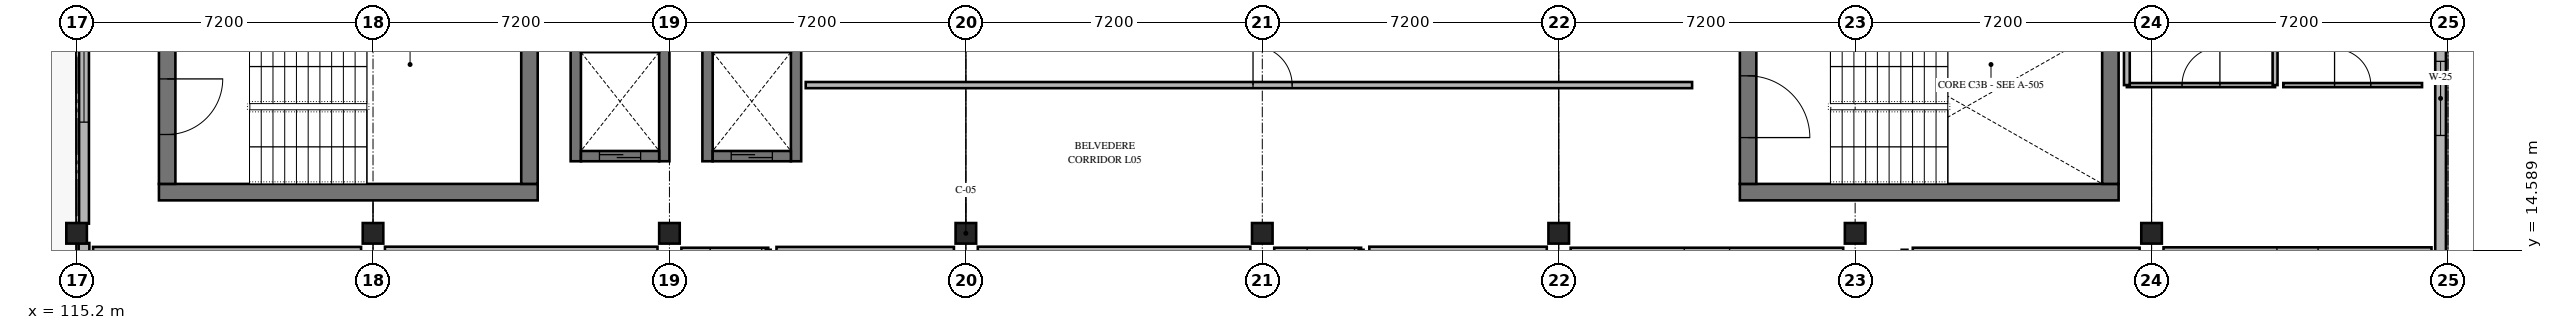
"""IFC4 building model, lengths in metres.
Left out: names, types, materials, properties, quantities, classifications, styles, units other than length and angle.
Written with IfcOpenShell. Run it as: python <this file> out.ifc"""

import sys

from ifc_helpers import new_model, si_unit, direction, frame, frame_2d, origin, origin_2d, place, context, subcontext, project, spatial, rectangle, extrude, element, fill, save


model = new_model("IFC4")
c1 = context("Model", 3, precision=1e-05, world=origin(), true_north=direction((0.0, 1.0)))
c2 = subcontext(c1, "Body", "Model", "MODEL_VIEW")
j1 = project(units=[si_unit("LENGTHUNIT", "METRE"), si_unit("PLANEANGLEUNIT", "RADIAN")], contexts=[c1])
p1 = place(None, origin())
s1 = spatial("IfcSite", under=j1, at=p1, CompositionType="ELEMENT")
p2 = place(p1, origin())
s2 = spatial("IfcBuilding", under=s1, at=p2, CompositionType="ELEMENT")
p3 = place(p2, frame((0.0, 0.0, 20.7)))
s3 = spatial("IfcBuildingStorey", under=s2, at=p3, CompositionType="ELEMENT", Elevation=20.7)
for number, where, z_axis, x_axis in (
    (1, (115.2, 15.0, 0.0), (0.0, 0.0, 1.0), (1.0, 0.0, 0.0)),
    (2, (122.4, 15.0, 0.0), (0.0, 0.0, 1.0), (1.0, 0.0, 0.0)),
    (3, (129.6, 15.0, 0.0), (0.0, 0.0, 1.0), (1.0, 0.0, 0.0)),
    (4, (136.8, 15.0, 0.0), (0.0, 0.0, 1.0), (1.0, 0.0, 0.0)),
    (5, (144.0, 15.0, 0.0), (0.0, 0.0, 1.0), (1.0, 0.0, 0.0)),
    (6, (151.2, 15.0, 0.0), (0.0, 0.0, 1.0), (1.0, 0.0, 0.0)),
    (7, (158.4, 15.0, 0.0), (0.0, 0.0, 1.0), (1.0, 0.0, 0.0)),
    (8, (165.6, 15.0, 0.0), (0.0, 0.0, 1.0), (1.0, 0.0, 0.0)),
):
    element("IfcColumn", number, at=place(p3, frame(where, z_axis=z_axis, x_axis=x_axis)), inside=s3, PredefinedType="COLUMN", context=c2, shape_type="SweptSolid", body=[
        extrude(rectangle(XDim=0.5, YDim=0.5, at=origin_2d()), origin(), (0.0, 0.0, 1.0), 3.9),
    ])
p4 = place(p3, frame((172.62, 22.165, 0.0), z_axis=(0.0, 0.0, 1.0), x_axis=(0.0, -1.0, 0.0)))
e9 = element("IfcWall", 9, at=p4, inside=s3, PredefinedType="SOLIDWALL", context=c2, shape_type="SweptSolid", body=[
    extrude(rectangle(XDim=7.777, YDim=0.26, at=frame_2d((3.889, 0.0))), origin(), (0.0, 0.0, 1.0), 2.9),
])
p5 = place(p4, frame((2.989, 0.0, 0.9)))
e10 = element("IfcOpeningElement", 10, at=p5, cuts=e9, PredefinedType="OPENING", context=c2, shape_type="SweptSolid", body=[
    extrude(rectangle(XDim=1.8, YDim=0.75, at=frame_2d((0.9, 0.375))), frame((0.0, 0.14, 0.0), z_axis=(0.0, -1.0, 0.0), x_axis=(1.0, 0.0, 0.0)), (0.0, 0.0, 1.0), 0.28),
])
p6 = place(p3, frame((115.38, 11.122, 0.0), z_axis=(0.0, 0.0, 1.0), x_axis=(0.0, 1.0, 0.0)))
e11 = element("IfcWall", 11, at=p6, inside=s3, PredefinedType="SOLIDWALL", context=c2, shape_type="SweptSolid", body=[
    extrude(rectangle(XDim=3.643, YDim=0.26, at=frame_2d((1.822, 0.0))), origin(), (0.0, 0.0, 1.0), 2.86),
])
p7 = place(p6, frame((0.972, 0.0, 0.9)))
e12 = element("IfcOpeningElement", 12, at=p7, cuts=e11, PredefinedType="OPENING", context=c2, shape_type="SweptSolid", body=[
    extrude(rectangle(XDim=1.7, YDim=0.85, at=frame_2d((0.85, 0.425))), frame((0.0, 0.14, 0.0), z_axis=(0.0, -1.0, 0.0), x_axis=(1.0, 0.0, 0.0)), (0.0, 0.0, 1.0), 0.28),
])
p8 = place(p3, frame((115.38, 15.235, 0.0), z_axis=(0.0, 0.0, 1.0), x_axis=(0.0, 1.0, 0.0)))
e13 = element("IfcWall", 13, at=p8, inside=s3, PredefinedType="SOLIDWALL", context=c2, shape_type="SweptSolid", body=[
    extrude(rectangle(XDim=6.93, YDim=0.24, at=frame_2d((3.465, 0.0))), origin(), (0.0, 0.0, 1.0), 2.86),
])
p9 = place(p8, frame((2.465, 0.0, 0.9)))
e14 = element("IfcOpeningElement", 14, at=p9, cuts=e13, PredefinedType="OPENING", context=c2, shape_type="SweptSolid", body=[
    extrude(rectangle(XDim=2.0, YDim=0.85, at=frame_2d((1.0, 0.425))), frame((0.0, 0.13, 0.0), z_axis=(0.0, -1.0, 0.0), x_axis=(1.0, 0.0, 0.0)), (0.0, 0.0, 1.0), 0.26),
])
p10 = place(p3, frame((117.2, 16.0, 0.0), z_axis=(0.0, 0.0, 1.0), x_axis=(1.0, 0.0, 0.0)))
e15 = element("IfcWall", 15, at=p10, inside=s3, PredefinedType="SHEAR", context=c2, shape_type="SweptSolid", body=[
    extrude(rectangle(XDim=9.2, YDim=0.4, at=frame_2d((4.6, 0.0))), origin(), (0.0, 0.0, 1.0), 3.9),
])
p11 = place(p3, frame((126.2, 16.2, 0.0), z_axis=(0.0, 0.0, 1.0), x_axis=(0.0, 1.0, 0.0)))
e16 = element("IfcWall", 16, at=p11, inside=s3, PredefinedType="SHEAR", context=c2, shape_type="SweptSolid", body=[
    extrude(rectangle(XDim=3.75, YDim=0.4, at=frame_2d((1.875, 0.0))), origin(), (0.0, 0.0, 1.0), 3.9),
])
p12 = place(p3, frame((117.4, 19.95, 0.0), z_axis=(0.0, 0.0, 1.0), x_axis=(0.0, -1.0, 0.0)))
e17 = element("IfcWall", 17, at=p12, inside=s3, PredefinedType="SHEAR", context=c2, shape_type="SweptSolid", body=[
    extrude(rectangle(XDim=3.75, YDim=0.4, at=frame_2d((1.875, 0.0))), origin(), (0.0, 0.0, 1.0), 3.9),
])
p13 = place(p12, frame((1.2, 0.0, 0.0)))
e18 = element("IfcOpeningElement", 18, at=p13, cuts=e17, PredefinedType="OPENING", context=c2, shape_type="SweptSolid", body=[
    extrude(rectangle(XDim=1.35, YDim=2.2, at=frame_2d((0.675, 1.1))), frame((0.0, 0.21, 0.0), z_axis=(0.0, -1.0, 0.0), x_axis=(1.0, 0.0, 0.0)), (0.0, 0.0, 1.0), 0.42),
])
p14 = place(p3, frame((155.6, 16.0, 0.0), z_axis=(0.0, 0.0, 1.0), x_axis=(1.0, 0.0, 0.0)))
e19 = element("IfcWall", 19, at=p14, inside=s3, PredefinedType="SHEAR", context=c2, shape_type="SweptSolid", body=[
    extrude(rectangle(XDim=9.2, YDim=0.4, at=frame_2d((4.6, 0.0))), origin(), (0.0, 0.0, 1.0), 3.9),
])
p15 = place(p3, frame((164.6, 16.2, 0.0), z_axis=(0.0, 0.0, 1.0), x_axis=(0.0, 1.0, 0.0)))
e20 = element("IfcWall", 20, at=p15, inside=s3, PredefinedType="SHEAR", context=c2, shape_type="SweptSolid", body=[
    extrude(rectangle(XDim=3.75, YDim=0.4, at=frame_2d((1.875, 0.0))), origin(), (0.0, 0.0, 1.0), 3.9),
])
p16 = place(p3, frame((155.8, 19.95, 0.0), z_axis=(0.0, 0.0, 1.0), x_axis=(0.0, -1.0, 0.0)))
e21 = element("IfcWall", 21, at=p16, inside=s3, PredefinedType="SHEAR", context=c2, shape_type="SweptSolid", body=[
    extrude(rectangle(XDim=3.75, YDim=0.4, at=frame_2d((1.875, 0.0))), origin(), (0.0, 0.0, 1.0), 3.9),
])
p17 = place(p16, frame((1.125, 0.0, 0.0)))
e22 = element("IfcOpeningElement", 22, at=p17, cuts=e21, PredefinedType="OPENING", context=c2, shape_type="SweptSolid", body=[
    extrude(rectangle(XDim=1.5, YDim=2.2, at=frame_2d((0.75, 1.1))), frame((0.0, 0.21, 0.0), z_axis=(0.0, -1.0, 0.0), x_axis=(1.0, 0.0, 0.0)), (0.0, 0.0, 1.0), 0.42),
])
for number, where, z_axis, x_axis in (
    (23, (127.325, 16.75, 0.0), (0.0, 0.0, 1.0), (0.0, 1.0, 0.0)),
    (24, (129.475, 19.65, 0.0), (0.0, 0.0, 1.0), (0.0, -1.0, 0.0)),
):
    element("IfcWall", number, at=place(p3, frame(where, z_axis=z_axis, x_axis=x_axis)), inside=s3, PredefinedType="SOLIDWALL", context=c2, shape_type="SweptSolid", body=[
        extrude(rectangle(XDim=2.9, YDim=0.25, at=frame_2d((1.45, 0.0))), origin(), (0.0, 0.0, 1.0), 3.66),
    ])
p18 = place(p3, frame((127.45, 16.875, 0.0), z_axis=(0.0, 0.0, 1.0), x_axis=(1.0, 0.0, 0.0)))
e25 = element("IfcWall", 25, at=p18, inside=s3, PredefinedType="SOLIDWALL", context=c2, shape_type="SweptSolid", body=[
    extrude(rectangle(XDim=1.9, YDim=0.25, at=frame_2d((0.95, 0.0))), origin(), (0.0, 0.0, 1.0), 3.66),
])
p19 = place(p18, frame((0.45, 0.0, 0.0)))
e26 = element("IfcOpeningElement", 26, at=p19, cuts=e25, PredefinedType="OPENING", context=c2, shape_type="SweptSolid", body=[
    extrude(rectangle(XDim=1.0, YDim=2.2, at=frame_2d((0.5, 1.1))), frame((0.0, 0.135, 0.0), z_axis=(0.0, -1.0, 0.0), x_axis=(1.0, 0.0, 0.0)), (0.0, 0.0, 1.0), 0.27),
])
for number, where, z_axis, x_axis in (
    (27, (130.525, 16.75, 0.0), (0.0, 0.0, 1.0), (0.0, 1.0, 0.0)),
    (28, (132.675, 19.65, 0.0), (0.0, 0.0, 1.0), (0.0, -1.0, 0.0)),
):
    element("IfcWall", number, at=place(p3, frame(where, z_axis=z_axis, x_axis=x_axis)), inside=s3, PredefinedType="SOLIDWALL", context=c2, shape_type="SweptSolid", body=[
        extrude(rectangle(XDim=2.9, YDim=0.25, at=frame_2d((1.45, 0.0))), origin(), (0.0, 0.0, 1.0), 3.66),
    ])
p20 = place(p3, frame((130.65, 16.875, 0.0), z_axis=(0.0, 0.0, 1.0), x_axis=(1.0, 0.0, 0.0)))
e29 = element("IfcWall", 29, at=p20, inside=s3, PredefinedType="SOLIDWALL", context=c2, shape_type="SweptSolid", body=[
    extrude(rectangle(XDim=1.9, YDim=0.25, at=frame_2d((0.95, 0.0))), origin(), (0.0, 0.0, 1.0), 3.66),
])
p21 = place(p20, frame((0.45, 0.0, 0.0)))
e30 = element("IfcOpeningElement", 30, at=p21, cuts=e29, PredefinedType="OPENING", context=c2, shape_type="SweptSolid", body=[
    extrude(rectangle(XDim=1.0, YDim=2.2, at=frame_2d((0.5, 1.1))), frame((0.0, 0.135, 0.0), z_axis=(0.0, -1.0, 0.0), x_axis=(1.0, 0.0, 0.0)), (0.0, 0.0, 1.0), 0.27),
])
p22 = place(p3, frame((132.0, 14.6, 0.0), z_axis=(0.0, 0.0, 1.0), x_axis=(-1.0, 0.0, 0.0)))
e31 = element("IfcWall", 31, at=p22, inside=s3, PredefinedType="PARTITIONING", context=c2, shape_type="SweptSolid", body=[
    extrude(rectangle(XDim=2.11, YDim=0.1, at=frame_2d((1.055, 0.0))), origin(), (0.0, 0.0, 1.0), 3.66),
])
p23 = place(p22, frame((0.16, 0.0, 0.0)))
e32 = element("IfcOpeningElement", 32, at=p23, cuts=e31, PredefinedType="OPENING", context=c2, shape_type="SweptSolid", body=[
    extrude(rectangle(XDim=1.25, YDim=2.2, at=frame_2d((0.625, 1.1))), frame((0.0, 0.06, 0.0), z_axis=(0.0, -1.0, 0.0), x_axis=(1.0, 0.0, 0.0)), (0.0, 0.0, 1.0), 0.12),
])
p24 = place(p3, frame((129.31, 14.6, 0.0), z_axis=(0.0, 0.0, 1.0), x_axis=(-1.0, 0.0, 0.0)))
e33 = element("IfcWall", 33, at=p24, inside=s3, PredefinedType="PARTITIONING", context=c2, shape_type="SweptSolid", body=[
    extrude(rectangle(XDim=6.62, YDim=0.15, at=frame_2d((3.31, 0.0))), origin(), (0.0, 0.0, 1.0), 3.66),
])
p25 = place(p3, frame((122.11, 14.6, 0.0), z_axis=(0.0, 0.0, 1.0), x_axis=(-1.0, 0.0, 0.0)))
e34 = element("IfcWall", 34, at=p25, inside=s3, PredefinedType="PARTITIONING", context=c2, shape_type="SweptSolid", body=[
    extrude(rectangle(XDim=6.51, YDim=0.14, at=frame_2d((3.255, 0.0))), origin(), (0.0, 0.0, 1.0), 3.66),
])
p26 = place(p3, frame((146.4, 14.6, 0.0), z_axis=(0.0, 0.0, 1.0), x_axis=(-1.0, 0.0, 0.0)))
e35 = element("IfcWall", 35, at=p26, inside=s3, PredefinedType="PARTITIONING", context=c2, shape_type="SweptSolid", body=[
    extrude(rectangle(XDim=2.11, YDim=0.1, at=frame_2d((1.055, 0.0))), origin(), (0.0, 0.0, 1.0), 3.66),
])
p27 = place(p26, frame((0.16, 0.0, 0.0)))
e36 = element("IfcOpeningElement", 36, at=p27, cuts=e35, PredefinedType="OPENING", context=c2, shape_type="SweptSolid", body=[
    extrude(rectangle(XDim=1.15, YDim=2.15, at=frame_2d((0.575, 1.075))), frame((0.0, 0.06, 0.0), z_axis=(0.0, -1.0, 0.0), x_axis=(1.0, 0.0, 0.0)), (0.0, 0.0, 1.0), 0.12),
])
p28 = place(p3, frame((143.71, 14.6, 0.0), z_axis=(0.0, 0.0, 1.0), x_axis=(-1.0, 0.0, 0.0)))
e37 = element("IfcWall", 37, at=p28, inside=s3, PredefinedType="PARTITIONING", context=c2, shape_type="SweptSolid", body=[
    extrude(rectangle(XDim=6.62, YDim=0.15, at=frame_2d((3.31, 0.0))), origin(), (0.0, 0.0, 1.0), 3.66),
])
p29 = place(p3, frame((136.51, 14.6, 0.0), z_axis=(0.0, 0.0, 1.0), x_axis=(-1.0, 0.0, 0.0)))
e38 = element("IfcWall", 38, at=p29, inside=s3, PredefinedType="PARTITIONING", context=c2, shape_type="SweptSolid", body=[
    extrude(rectangle(XDim=4.31, YDim=0.14, at=frame_2d((2.155, 0.0))), origin(), (0.0, 0.0, 1.0), 3.66),
])
p30 = place(p3, frame((158.11, 14.6, 0.0), z_axis=(0.0, 0.0, 1.0), x_axis=(-1.0, 0.0, 0.0)))
e39 = element("IfcWall", 39, at=p30, inside=s3, PredefinedType="PARTITIONING", context=c2, shape_type="SweptSolid", body=[
    extrude(rectangle(XDim=6.62, YDim=0.1, at=frame_2d((3.31, 0.0))), origin(), (0.0, 0.0, 1.0), 3.66),
])
p31 = place(p30, frame((2.76, 0.0, 0.0)))
e40 = element("IfcOpeningElement", 40, at=p31, cuts=e39, PredefinedType="OPENING", context=c2, shape_type="SweptSolid", body=[
    extrude(rectangle(XDim=1.1, YDim=2.15, at=frame_2d((0.55, 1.075))), frame((0.0, 0.06, 0.0), z_axis=(0.0, -1.0, 0.0), x_axis=(1.0, 0.0, 0.0)), (0.0, 0.0, 1.0), 0.12),
])
p32 = place(p3, frame((150.91, 14.6, 0.0), z_axis=(0.0, 0.0, 1.0), x_axis=(-1.0, 0.0, 0.0)))
e41 = element("IfcWall", 41, at=p32, inside=s3, PredefinedType="PARTITIONING", context=c2, shape_type="SweptSolid", body=[
    extrude(rectangle(XDim=4.31, YDim=0.15, at=frame_2d((2.155, 0.0))), origin(), (0.0, 0.0, 1.0), 3.66),
])
p33 = place(p3, frame((172.4, 14.6, 0.0), z_axis=(0.0, 0.0, 1.0), x_axis=(-1.0, 0.0, 0.0)))
e42 = element("IfcWall", 42, at=p33, inside=s3, PredefinedType="PARTITIONING", context=c2, shape_type="SweptSolid", body=[
    extrude(rectangle(XDim=6.51, YDim=0.12, at=frame_2d((3.255, 0.0))), origin(), (0.0, 0.0, 1.0), 3.66),
])
p34 = place(p33, frame((2.755, 0.0, 0.0)))
e43 = element("IfcOpeningElement", 43, at=p34, cuts=e42, PredefinedType="OPENING", context=c2, shape_type="SweptSolid", body=[
    extrude(rectangle(XDim=1.0, YDim=2.15, at=frame_2d((0.5, 1.075))), frame((0.0, 0.07, 0.0), z_axis=(0.0, -1.0, 0.0), x_axis=(1.0, 0.0, 0.0)), (0.0, 0.0, 1.0), 0.14),
])
p35 = place(p3, frame((165.31, 14.6, 0.0), z_axis=(0.0, 0.0, 1.0), x_axis=(-1.0, 0.0, 0.0)))
e44 = element("IfcWall", 44, at=p35, inside=s3, PredefinedType="PARTITIONING", context=c2, shape_type="SweptSolid", body=[
    extrude(rectangle(XDim=5.51, YDim=0.1, at=frame_2d((2.755, 0.0))), origin(), (0.0, 0.0, 1.0), 3.66),
])
p36 = place(p3, frame((132.91, 18.6, 0.0), z_axis=(0.0, 0.0, 1.0), x_axis=(1.0, 0.0, 0.0)))
e45 = element("IfcWall", 45, at=p36, inside=s3, PredefinedType="PARTITIONING", context=c2, shape_type="SweptSolid", body=[
    extrude(rectangle(XDim=21.53, YDim=0.15, at=frame_2d((10.765, 0.0))), origin(), (0.0, 0.0, 1.0), 2.86),
])
p37 = place(p36, frame((10.865, 0.0, 0.0)))
e46 = element("IfcOpeningElement", 46, at=p37, cuts=e45, PredefinedType="OPENING", context=c2, shape_type="SweptSolid", body=[
    extrude(rectangle(XDim=0.95, YDim=2.15, at=frame_2d((0.475, 1.075))), frame((0.0, 0.085, 0.0), z_axis=(0.0, -1.0, 0.0), x_axis=(1.0, 0.0, 0.0)), (0.0, 0.0, 1.0), 0.17),
])
p38 = place(p3, frame((165.0, 18.6, 0.0), z_axis=(0.0, 0.0, 1.0), x_axis=(1.0, 0.0, 0.0)))
e47 = element("IfcWall", 47, at=p38, inside=s3, PredefinedType="PARTITIONING", context=c2, shape_type="SweptSolid", body=[
    extrude(rectangle(XDim=3.6, YDim=0.1, at=frame_2d((1.8, 0.0))), origin(), (0.0, 0.0, 1.0), 2.91),
])
p39 = place(p38, frame((1.34, 0.0, 0.0)))
e48 = element("IfcOpeningElement", 48, at=p39, cuts=e47, PredefinedType="OPENING", context=c2, shape_type="SweptSolid", body=[
    extrude(rectangle(XDim=0.92, YDim=2.1, at=frame_2d((0.46, 1.05))), frame((0.0, 0.06, 0.0), z_axis=(0.0, -1.0, 0.0), x_axis=(1.0, 0.0, 0.0)), (0.0, 0.0, 1.0), 0.12),
])
p40 = place(p3, frame((165.0, 20.5, 0.0), z_axis=(0.0, 0.0, 1.0), x_axis=(0.0, -1.0, 0.0)))
e49 = element("IfcWall", 49, at=p40, inside=s3, PredefinedType="PARTITIONING", context=c2, shape_type="SweptSolid", body=[
    extrude(rectangle(XDim=1.9, YDim=0.14, at=frame_2d((0.95, 0.0))), origin(), (0.0, 0.0, 1.0), 3.66),
])
p41 = place(p3, frame((168.6, 18.6, 0.0), z_axis=(0.0, 0.0, 1.0), x_axis=(0.0, 1.0, 0.0)))
e50 = element("IfcWall", 50, at=p41, inside=s3, PredefinedType="PARTITIONING", context=c2, shape_type="SweptSolid", body=[
    extrude(rectangle(XDim=1.9, YDim=0.12, at=frame_2d((0.95, 0.0))), origin(), (0.0, 0.0, 1.0), 2.9),
])
p42 = place(p3, frame((168.8, 18.6, 0.0), z_axis=(0.0, 0.0, 1.0), x_axis=(1.0, 0.0, 0.0)))
e51 = element("IfcWall", 51, at=p42, inside=s3, PredefinedType="PARTITIONING", context=c2, shape_type="SweptSolid", body=[
    extrude(rectangle(XDim=3.37, YDim=0.1, at=frame_2d((1.685, 0.0))), origin(), (0.0, 0.0, 1.0), 3.66),
])
p43 = place(p42, frame((1.245, 0.0, 0.0)))
e52 = element("IfcOpeningElement", 52, at=p43, cuts=e51, PredefinedType="OPENING", context=c2, shape_type="SweptSolid", body=[
    extrude(rectangle(XDim=0.88, YDim=2.1, at=frame_2d((0.44, 1.05))), frame((0.0, 0.06, 0.0), z_axis=(0.0, -1.0, 0.0), x_axis=(1.0, 0.0, 0.0)), (0.0, 0.0, 1.0), 0.12),
])
p44 = place(p5, origin())
e53 = element("IfcWindow", 53, at=p44, inside=s3, PartitioningType="SINGLE_PANEL", PredefinedType="WINDOW", context=c2, shape_type="SweptSolid", body=[
    extrude(rectangle(XDim=1.8, YDim=0.75, at=frame_2d((0.9, 0.375))), frame((0.0, 0.03, 0.0), z_axis=(0.0, -1.0, 0.0), x_axis=(1.0, 0.0, 0.0)), (0.0, 0.0, 1.0), 0.06),
])
fill(e10, e53)
p45 = place(p9, origin())
e54 = element("IfcWindow", 54, at=p45, inside=s3, PartitioningType="SINGLE_PANEL", PredefinedType="WINDOW", context=c2, shape_type="SweptSolid", body=[
    extrude(rectangle(XDim=2.0, YDim=0.85, at=frame_2d((1.0, 0.425))), frame((0.0, 0.03, 0.0), z_axis=(0.0, -1.0, 0.0), x_axis=(1.0, 0.0, 0.0)), (0.0, 0.0, 1.0), 0.06),
])
fill(e14, e54)
p46 = place(p13, origin())
e55 = element("IfcDoor", 55, at=p46, inside=s3, OperationType="SINGLE_SWING_LEFT", PredefinedType="DOOR", context=c2, shape_type="SweptSolid", body=[
    extrude(rectangle(XDim=1.35, YDim=2.2, at=frame_2d((0.675, 1.1))), frame((0.0, 0.025, 0.0), z_axis=(0.0, -1.0, 0.0), x_axis=(1.0, 0.0, 0.0)), (0.0, 0.0, 1.0), 0.05),
])
fill(e18, e55)
p47 = place(p17, origin())
e56 = element("IfcDoor", 56, at=p47, inside=s3, OperationType="SINGLE_SWING_RIGHT", PredefinedType="DOOR", context=c2, shape_type="SweptSolid", body=[
    extrude(rectangle(XDim=1.5, YDim=2.2, at=frame_2d((0.75, 1.1))), frame((0.0, 0.025, 0.0), z_axis=(0.0, -1.0, 0.0), x_axis=(1.0, 0.0, 0.0)), (0.0, 0.0, 1.0), 0.05),
])
fill(e22, e56)
p48 = place(p19, origin())
e57 = element("IfcDoor", 57, at=p48, inside=s3, OperationType="DOUBLE_DOOR_SLIDING", PredefinedType="DOOR", context=c2, shape_type="SweptSolid", body=[
    extrude(rectangle(XDim=1.0, YDim=2.2, at=frame_2d((0.5, 1.1))), frame((0.0, 0.025, 0.0), z_axis=(0.0, -1.0, 0.0), x_axis=(1.0, 0.0, 0.0)), (0.0, 0.0, 1.0), 0.05),
])
fill(e26, e57)
p49 = place(p21, origin())
e58 = element("IfcDoor", 58, at=p49, inside=s3, OperationType="DOUBLE_DOOR_SLIDING", PredefinedType="DOOR", context=c2, shape_type="SweptSolid", body=[
    extrude(rectangle(XDim=1.0, YDim=2.2, at=frame_2d((0.5, 1.1))), frame((0.0, 0.025, 0.0), z_axis=(0.0, -1.0, 0.0), x_axis=(1.0, 0.0, 0.0)), (0.0, 0.0, 1.0), 0.05),
])
fill(e30, e58)
p50 = place(p23, origin())
e59 = element("IfcDoor", 59, at=p50, inside=s3, OperationType="SINGLE_SWING_LEFT", PredefinedType="DOOR", context=c2, shape_type="SweptSolid", body=[
    extrude(rectangle(XDim=1.25, YDim=2.2, at=frame_2d((0.625, 1.1))), frame((0.0, 0.025, 0.0), z_axis=(0.0, -1.0, 0.0), x_axis=(1.0, 0.0, 0.0)), (0.0, 0.0, 1.0), 0.05),
])
fill(e32, e59)
p51 = place(p27, origin())
e60 = element("IfcDoor", 60, at=p51, inside=s3, OperationType="SINGLE_SWING_LEFT", PredefinedType="DOOR", context=c2, shape_type="SweptSolid", body=[
    extrude(rectangle(XDim=1.15, YDim=2.15, at=frame_2d((0.575, 1.075))), frame((0.0, 0.025, 0.0), z_axis=(0.0, -1.0, 0.0), x_axis=(1.0, 0.0, 0.0)), (0.0, 0.0, 1.0), 0.05),
])
fill(e36, e60)
p52 = place(p31, origin())
e61 = element("IfcDoor", 61, at=p52, inside=s3, OperationType="SINGLE_SWING_LEFT", PredefinedType="DOOR", context=c2, shape_type="SweptSolid", body=[
    extrude(rectangle(XDim=1.1, YDim=2.15, at=frame_2d((0.55, 1.075))), frame((0.0, 0.025, 0.0), z_axis=(0.0, -1.0, 0.0), x_axis=(1.0, 0.0, 0.0)), (0.0, 0.0, 1.0), 0.05),
])
fill(e40, e61)
p53 = place(p34, origin())
e62 = element("IfcDoor", 62, at=p53, inside=s3, OperationType="SINGLE_SWING_RIGHT", PredefinedType="DOOR", context=c2, shape_type="SweptSolid", body=[
    extrude(rectangle(XDim=1.0, YDim=2.15, at=frame_2d((0.5, 1.075))), frame((0.0, 0.025, 0.0), z_axis=(0.0, -1.0, 0.0), x_axis=(1.0, 0.0, 0.0)), (0.0, 0.0, 1.0), 0.05),
])
fill(e43, e62)
p54 = place(p37, origin())
e63 = element("IfcDoor", 63, at=p54, inside=s3, OperationType="SINGLE_SWING_LEFT", PredefinedType="DOOR", context=c2, shape_type="SweptSolid", body=[
    extrude(rectangle(XDim=0.95, YDim=2.15, at=frame_2d((0.475, 1.075))), frame((0.0, 0.025, 0.0), z_axis=(0.0, -1.0, 0.0), x_axis=(1.0, 0.0, 0.0)), (0.0, 0.0, 1.0), 0.05),
])
fill(e46, e63)
p55 = place(p39, origin())
e64 = element("IfcDoor", 64, at=p55, inside=s3, OperationType="SINGLE_SWING_RIGHT", PredefinedType="DOOR", context=c2, shape_type="SweptSolid", body=[
    extrude(rectangle(XDim=0.92, YDim=2.1, at=frame_2d((0.46, 1.05))), frame((0.0, 0.025, 0.0), z_axis=(0.0, -1.0, 0.0), x_axis=(1.0, 0.0, 0.0)), (0.0, 0.0, 1.0), 0.05),
])
fill(e48, e64)
p56 = place(p43, origin())
e65 = element("IfcDoor", 65, at=p56, inside=s3, OperationType="SINGLE_SWING_LEFT", PredefinedType="DOOR", context=c2, shape_type="SweptSolid", body=[
    extrude(rectangle(XDim=0.88, YDim=2.1, at=frame_2d((0.44, 1.05))), frame((0.0, 0.025, 0.0), z_axis=(0.0, -1.0, 0.0), x_axis=(1.0, 0.0, 0.0)), (0.0, 0.0, 1.0), 0.05),
])
fill(e52, e65)
save(model, sys.argv[1])
